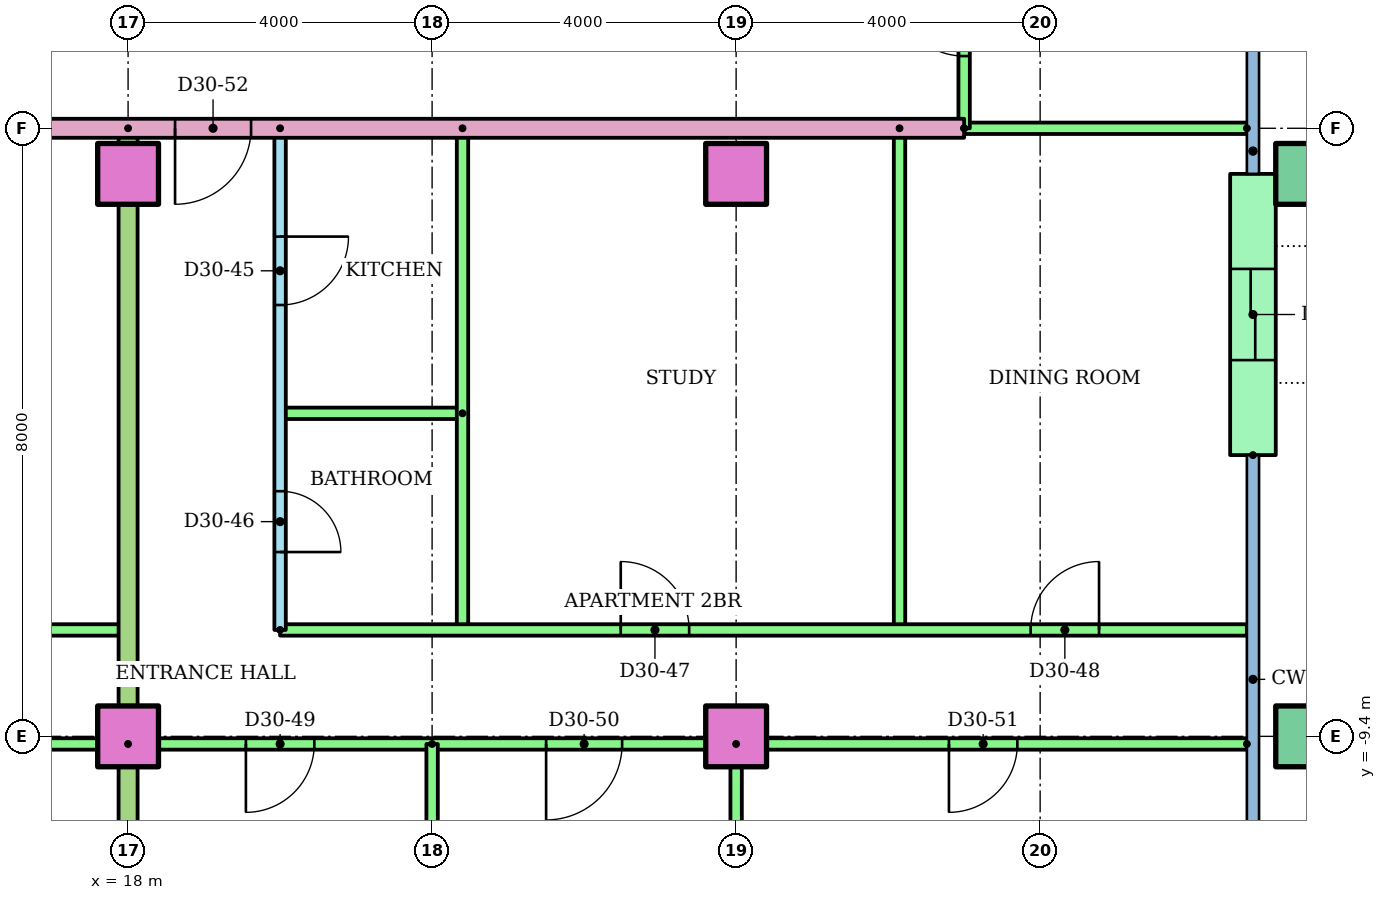
"""IFC4 building model, lengths in metres.
Left out: names, types, materials, properties, quantities, classifications, styles, units other than length and angle.
Written with IfcOpenShell. Run it as: python <this file> out.ifc"""

import sys

from ifc_helpers import new_model, si_unit, direction, frame, frame_2d, origin, origin_2d, place, context, subcontext, project, spatial, rectangle, hollow_rectangle, extrude, element, fill, save


model = new_model("IFC4")
c1 = context("Model", 3, precision=1e-05, world=origin(), true_north=direction((0.0, 1.0)))
c2 = subcontext(c1, "Body", "Model", "MODEL_VIEW")
j1 = project(units=[si_unit("LENGTHUNIT", "METRE"), si_unit("PLANEANGLEUNIT", "RADIAN")], contexts=[c1])
p1 = place(None, origin())
s1 = spatial("IfcSite", under=j1, at=p1, CompositionType="ELEMENT")
p2 = place(p1, origin())
s2 = spatial("IfcBuilding", under=s1, at=p2, CompositionType="ELEMENT")
p3 = place(p2, frame((0.0, 0.0, 119.8)))
s3 = spatial("IfcBuildingStorey", under=s2, at=p3, CompositionType="ELEMENT", Elevation=119.8)
for number, where in (
    (1, (18.0, -9.4, 0.0)),
    (2, (26.0, -9.4, 0.0)),
):
    element("IfcColumn", number, at=place(p3, frame(where)), inside=s3, PredefinedType="COLUMN", context=c2, shape_type="SweptSolid", body=[
        extrude(rectangle(XDim=0.8, YDim=0.8, at=origin_2d()), origin(), (0.0, 0.0, 1.0), 3.2),
    ])
p4 = place(p3, frame((33.5, -9.4, 0.0)))
e3 = element("IfcColumn", 3, at=p4, inside=s3, PredefinedType="COLUMN", context=c2, shape_type="SweptSolid", body=[
    extrude(hollow_rectangle(XDim=0.8, YDim=0.8, WallThickness=0.04, at=origin_2d()), origin(), (0.0, 0.0, 1.0), 3.2),
])
for number, where in (
    (4, (18.0, -2.0, 0.0)),
    (5, (26.0, -2.0, 0.0)),
):
    element("IfcColumn", number, at=place(p3, frame(where)), inside=s3, PredefinedType="COLUMN", context=c2, shape_type="SweptSolid", body=[
        extrude(rectangle(XDim=0.8, YDim=0.8, at=origin_2d()), origin(), (0.0, 0.0, 1.0), 3.2),
    ])
p5 = place(p3, frame((33.5, -2.0, 0.0)))
e6 = element("IfcColumn", 6, at=p5, inside=s3, PredefinedType="COLUMN", context=c2, shape_type="SweptSolid", body=[
    extrude(hollow_rectangle(XDim=0.8, YDim=0.8, WallThickness=0.04, at=origin_2d()), origin(), (0.0, 0.0, 1.0), 3.2),
])
p6 = place(p3, frame((32.8, -5.7, 0.0), z_axis=(0.0, 0.0, 1.0), x_axis=(0.0, 1.0, 0.0)))
e7 = element("IfcWall", 7, at=p6, inside=s3, PredefinedType="STANDARD", context=c2, shape_type="SweptSolid", body=[
    extrude(rectangle(XDim=3.7, YDim=0.6, at=frame_2d((1.85, 0.0))), origin(), (0.0, 0.0, 1.0), 2.92),
])
p7 = place(p6, frame((1.25, 0.0, 0.0)))
e8 = element("IfcOpeningElement", 8, at=p7, cuts=e7, PredefinedType="OPENING", context=c2, shape_type="SweptSolid", body=[
    extrude(rectangle(XDim=1.2, YDim=2.1, at=frame_2d((0.6, 1.05))), frame((0.0, 0.31, 0.0), z_axis=(0.0, -1.0, 0.0), x_axis=(1.0, 0.0, 0.0)), (0.0, 0.0, 1.0), 0.62),
])
p8 = place(p3, frame((4.0, -8.0, 0.0)))
e9 = element("IfcWall", 9, at=p8, inside=s3, PredefinedType="PARTITIONING", context=c2, shape_type="SweptSolid", body=[
    extrude(rectangle(XDim=14.0, YDim=0.15, at=frame_2d((7.0, 0.0))), origin(), (0.0, 0.0, 1.0), 2.4),
])
p9 = place(p8, frame((4.325, 0.0, 0.0)))
e10 = element("IfcOpeningElement", 10, at=p9, cuts=e9, PredefinedType="OPENING", context=c2, shape_type="SweptSolid", body=[
    extrude(rectangle(XDim=0.9, YDim=2.1, at=frame_2d((0.45, 1.05))), frame((0.0, 0.085, 0.0), z_axis=(0.0, -1.0, 0.0), x_axis=(1.0, 0.0, 0.0)), (0.0, 0.0, 1.0), 0.17),
])
p10 = place(p8, frame((8.575, 0.0, 0.0)))
e11 = element("IfcOpeningElement", 11, at=p10, cuts=e9, PredefinedType="OPENING", context=c2, shape_type="SweptSolid", body=[
    extrude(rectangle(XDim=0.9, YDim=2.1, at=frame_2d((0.45, 1.05))), frame((0.0, 0.085, 0.0), z_axis=(0.0, -1.0, 0.0), x_axis=(1.0, 0.0, 0.0)), (0.0, 0.0, 1.0), 0.17),
])
p11 = place(p8, frame((12.0, 0.0, 0.0)))
e12 = element("IfcOpeningElement", 12, at=p11, cuts=e9, PredefinedType="OPENING", context=c2, shape_type="SweptSolid", body=[
    extrude(rectangle(XDim=0.9, YDim=2.1, at=frame_2d((0.45, 1.05))), frame((0.0, 0.085, 0.0), z_axis=(0.0, -1.0, 0.0), x_axis=(1.0, 0.0, 0.0)), (0.0, 0.0, 1.0), 0.17),
])
p12 = place(p3, frame((18.0, -9.5, 0.0), z_axis=(0.0, 0.0, 1.0), x_axis=(-1.0, 0.0, 0.0)))
e13 = element("IfcWall", 13, at=p12, inside=s3, PredefinedType="PARTITIONING", context=c2, shape_type="SweptSolid", body=[
    extrude(rectangle(XDim=16.0, YDim=0.15, at=frame_2d((8.0, 0.0))), origin(), (0.0, 0.0, 1.0), 2.4),
])
p13 = place(p12, frame((13.55, 0.0, 0.0)))
e14 = element("IfcOpeningElement", 14, at=p13, cuts=e13, PredefinedType="OPENING", context=c2, shape_type="SweptSolid", body=[
    extrude(rectangle(XDim=0.9, YDim=2.1, at=frame_2d((0.45, 1.05))), frame((0.0, 0.085, 0.0), z_axis=(0.0, -1.0, 0.0), x_axis=(1.0, 0.0, 0.0)), (0.0, 0.0, 1.0), 0.17),
])
p14 = place(p12, frame((9.55, 0.0, 0.0)))
e15 = element("IfcOpeningElement", 15, at=p14, cuts=e13, PredefinedType="OPENING", context=c2, shape_type="SweptSolid", body=[
    extrude(rectangle(XDim=0.9, YDim=2.1, at=frame_2d((0.45, 1.05))), frame((0.0, 0.085, 0.0), z_axis=(0.0, -1.0, 0.0), x_axis=(1.0, 0.0, 0.0)), (0.0, 0.0, 1.0), 0.17),
])
p15 = place(p12, frame((5.55, 0.0, 0.0)))
e16 = element("IfcOpeningElement", 16, at=p15, cuts=e13, PredefinedType="OPENING", context=c2, shape_type="SweptSolid", body=[
    extrude(rectangle(XDim=0.9, YDim=2.1, at=frame_2d((0.45, 1.05))), frame((0.0, 0.085, 0.0), z_axis=(0.0, -1.0, 0.0), x_axis=(1.0, 0.0, 0.0)), (0.0, 0.0, 1.0), 0.17),
])
p16 = place(p12, frame((1.5, 0.0, 0.0)))
e17 = element("IfcOpeningElement", 17, at=p16, cuts=e13, PredefinedType="OPENING", context=c2, shape_type="SweptSolid", body=[
    extrude(rectangle(XDim=1.0, YDim=2.1, at=frame_2d((0.5, 1.05))), frame((0.0, 0.085, 0.0), z_axis=(0.0, -1.0, 0.0), x_axis=(1.0, 0.0, 0.0)), (0.0, 0.0, 1.0), 0.17),
])
p17 = place(p3, frame((20.0, -1.4, 0.0), z_axis=(0.0, 0.0, 1.0), x_axis=(0.0, -1.0, 0.0)))
e18 = element("IfcWall", 18, at=p17, inside=s3, PredefinedType="PARTITIONING", context=c2, shape_type="SweptSolid", body=[
    extrude(rectangle(XDim=6.6, YDim=0.15, at=frame_2d((3.3, 0.0))), origin(), (0.0, 0.0, 1.0), 2.4),
])
p18 = place(p17, frame((1.425, 0.0, 0.0)))
e19 = element("IfcOpeningElement", 19, at=p18, cuts=e18, PredefinedType="OPENING", context=c2, shape_type="SweptSolid", body=[
    extrude(rectangle(XDim=0.9, YDim=2.1, at=frame_2d((0.45, 1.05))), frame((0.0, 0.085, 0.0), z_axis=(0.0, -1.0, 0.0), x_axis=(1.0, 0.0, 0.0)), (0.0, 0.0, 1.0), 0.17),
])
p19 = place(p17, frame((4.775, 0.0, 0.0)))
e20 = element("IfcOpeningElement", 20, at=p19, cuts=e18, PredefinedType="OPENING", context=c2, shape_type="SweptSolid", body=[
    extrude(rectangle(XDim=0.8, YDim=2.1, at=frame_2d((0.4, 1.05))), frame((0.0, 0.085, 0.0), z_axis=(0.0, -1.0, 0.0), x_axis=(1.0, 0.0, 0.0)), (0.0, 0.0, 1.0), 0.17),
])
p20 = place(p3, frame((22.4, -5.15, 0.0), z_axis=(0.0, 0.0, 1.0), x_axis=(-1.0, 0.0, 0.0)))
e21 = element("IfcWall", 21, at=p20, inside=s3, PredefinedType="PARTITIONING", context=c2, shape_type="SweptSolid", body=[
    extrude(rectangle(XDim=2.4, YDim=0.15, at=frame_2d((1.2, 0.0))), origin(), (0.0, 0.0, 1.0), 2.4),
])
for number, where, z_axis, x_axis in (
    (22, (22.4, -1.4, 0.0), (0.0, 0.0, 1.0), (0.0, -1.0, 0.0)),
    (23, (28.15, -1.4, 0.0), (0.0, 0.0, 1.0), (0.0, -1.0, 0.0)),
):
    element("IfcWall", number, at=place(p3, frame(where, z_axis=z_axis, x_axis=x_axis)), inside=s3, PredefinedType="PARTITIONING", context=c2, shape_type="SweptSolid", body=[
        extrude(rectangle(XDim=6.6, YDim=0.15, at=frame_2d((3.3, 0.0))), origin(), (0.0, 0.0, 1.0), 2.4),
    ])
p21 = place(p3, frame((20.0, -8.0, 0.0)))
e24 = element("IfcWall", 24, at=p21, inside=s3, PredefinedType="PARTITIONING", context=c2, shape_type="SweptSolid", body=[
    extrude(rectangle(XDim=12.72, YDim=0.15, at=frame_2d((6.36, 0.0))), origin(), (0.0, 0.0, 1.0), 2.4),
])
p22 = place(p21, frame((4.482, 0.0, 0.0)))
e25 = element("IfcOpeningElement", 25, at=p22, cuts=e24, PredefinedType="OPENING", context=c2, shape_type="SweptSolid", body=[
    extrude(rectangle(XDim=0.9, YDim=2.1, at=frame_2d((0.45, 1.05))), frame((0.0, 0.085, 0.0), z_axis=(0.0, -1.0, 0.0), x_axis=(1.0, 0.0, 0.0)), (0.0, 0.0, 1.0), 0.17),
])
p23 = place(p21, frame((9.875, 0.0, 0.0)))
e26 = element("IfcOpeningElement", 26, at=p23, cuts=e24, PredefinedType="OPENING", context=c2, shape_type="SweptSolid", body=[
    extrude(rectangle(XDim=0.9, YDim=2.1, at=frame_2d((0.45, 1.05))), frame((0.0, 0.085, 0.0), z_axis=(0.0, -1.0, 0.0), x_axis=(1.0, 0.0, 0.0)), (0.0, 0.0, 1.0), 0.17),
])
p24 = place(p3, frame((32.72, -9.5, 0.0), z_axis=(0.0, 0.0, 1.0), x_axis=(-1.0, 0.0, 0.0)))
e27 = element("IfcWall", 27, at=p24, inside=s3, PredefinedType="PARTITIONING", context=c2, shape_type="SweptSolid", body=[
    extrude(rectangle(XDim=14.72, YDim=0.15, at=frame_2d((7.36, 0.0))), origin(), (0.0, 0.0, 1.0), 2.4),
])
p25 = place(p24, frame((12.27, 0.0, 0.0)))
e28 = element("IfcOpeningElement", 28, at=p25, cuts=e27, PredefinedType="OPENING", context=c2, shape_type="SweptSolid", body=[
    extrude(rectangle(XDim=0.9, YDim=2.1, at=frame_2d((0.45, 1.05))), frame((0.0, 0.085, 0.0), z_axis=(0.0, -1.0, 0.0), x_axis=(1.0, 0.0, 0.0)), (0.0, 0.0, 1.0), 0.17),
])
p26 = place(p24, frame((8.22, 0.0, 0.0)))
e29 = element("IfcOpeningElement", 29, at=p26, cuts=e27, PredefinedType="OPENING", context=c2, shape_type="SweptSolid", body=[
    extrude(rectangle(XDim=1.0, YDim=2.1, at=frame_2d((0.5, 1.05))), frame((0.0, 0.085, 0.0), z_axis=(0.0, -1.0, 0.0), x_axis=(1.0, 0.0, 0.0)), (0.0, 0.0, 1.0), 0.17),
])
p27 = place(p24, frame((3.02, 0.0, 0.0)))
e30 = element("IfcOpeningElement", 30, at=p27, cuts=e27, PredefinedType="OPENING", context=c2, shape_type="SweptSolid", body=[
    extrude(rectangle(XDim=0.9, YDim=2.1, at=frame_2d((0.45, 1.05))), frame((0.0, 0.085, 0.0), z_axis=(0.0, -1.0, 0.0), x_axis=(1.0, 0.0, 0.0)), (0.0, 0.0, 1.0), 0.17),
])
p28 = place(p3, frame((22.0, -9.5, 0.0), z_axis=(0.0, 0.0, 1.0), x_axis=(0.0, -1.0, 0.0)))
e31 = element("IfcWall", 31, at=p28, inside=s3, PredefinedType="PARTITIONING", context=c2, shape_type="SweptSolid", body=[
    extrude(rectangle(XDim=6.821, YDim=0.15, at=frame_2d((3.411, 0.0))), origin(), (0.0, 0.0, 1.0), 2.4),
])
p29 = place(p3, frame((26.0, -9.5, 0.0), z_axis=(0.0, 0.0, 1.0), x_axis=(0.0, -1.0, 0.0)))
e32 = element("IfcWall", 32, at=p29, inside=s3, PredefinedType="PARTITIONING", context=c2, shape_type="SweptSolid", body=[
    extrude(rectangle(XDim=6.81, YDim=0.15, at=frame_2d((3.405, 0.0))), origin(), (0.0, 0.0, 1.0), 2.4),
])
p30 = place(p3, frame((18.0, -1.4, 0.0), z_axis=(0.0, 0.0, 1.0), x_axis=(0.0, -1.0, 0.0)))
e33 = element("IfcWall", 33, at=p30, inside=s3, PredefinedType="PARTITIONING", context=c2, shape_type="SweptSolid", body=[
    extrude(rectangle(XDim=14.91, YDim=0.25, at=frame_2d((7.455, 0.0))), origin(), (0.0, 0.0, 1.0), 2.4),
])
p31 = place(p3, frame((29.0, -1.4, 0.0), z_axis=(0.0, 0.0, 1.0), x_axis=(-1.0, 0.0, 0.0)))
e34 = element("IfcWall", 34, at=p31, inside=s3, PredefinedType="PARTITIONING", context=c2, shape_type="SweptSolid", body=[
    extrude(rectangle(XDim=15.0, YDim=0.25, at=frame_2d((7.5, 0.0))), origin(), (0.0, 0.0, 1.0), 2.4),
])
p32 = place(p31, frame((9.382, 0.0, 0.0)))
e35 = element("IfcOpeningElement", 35, at=p32, cuts=e34, PredefinedType="OPENING", context=c2, shape_type="SweptSolid", body=[
    extrude(rectangle(XDim=1.0, YDim=2.1, at=frame_2d((0.5, 1.05))), frame((0.0, 0.135, 0.0), z_axis=(0.0, -1.0, 0.0), x_axis=(1.0, 0.0, 0.0)), (0.0, 0.0, 1.0), 0.27),
])
p33 = place(p3, frame((32.72, -1.4, 0.0), z_axis=(0.0, 0.0, 1.0), x_axis=(-1.0, 0.0, 0.0)))
e36 = element("IfcWall", 36, at=p33, inside=s3, PredefinedType="PARTITIONING", context=c2, shape_type="SweptSolid", body=[
    extrude(rectangle(XDim=3.72, YDim=0.15, at=frame_2d((1.86, 0.0))), origin(), (0.0, 0.0, 1.0), 2.4),
])
p34 = place(p3, frame((29.0, -1.4, 0.0), z_axis=(0.0, 0.0, 1.0), x_axis=(0.0, 1.0, 0.0)))
e37 = element("IfcWall", 37, at=p34, inside=s3, PredefinedType="PARTITIONING", context=c2, shape_type="SweptSolid", body=[
    extrude(rectangle(XDim=2.8, YDim=0.15, at=frame_2d((1.4, 0.0))), origin(), (0.0, 0.0, 1.0), 2.4),
])
p35 = place(p34, frame((0.95, 0.0, 0.0)))
e38 = element("IfcOpeningElement", 38, at=p35, cuts=e37, PredefinedType="OPENING", context=c2, shape_type="SweptSolid", body=[
    extrude(rectangle(XDim=0.9, YDim=2.1, at=frame_2d((0.45, 1.05))), frame((0.0, 0.085, 0.0), z_axis=(0.0, -1.0, 0.0), x_axis=(1.0, 0.0, 0.0)), (0.0, 0.0, 1.0), 0.17),
])
p36 = place(p18, origin())
e39 = element("IfcDoor", 39, at=p36, inside=s3, OperationType="SINGLE_SWING_LEFT", PredefinedType="DOOR", context=c2, shape_type="SweptSolid", body=[
    extrude(rectangle(XDim=0.9, YDim=2.1, at=frame_2d((0.45, 1.05))), frame((0.0, 0.025, 0.0), z_axis=(0.0, -1.0, 0.0), x_axis=(1.0, 0.0, 0.0)), (0.0, 0.0, 1.0), 0.05),
])
fill(e19, e39)
p37 = place(p19, origin())
e40 = element("IfcDoor", 40, at=p37, inside=s3, OperationType="SINGLE_SWING_RIGHT", PredefinedType="DOOR", context=c2, shape_type="SweptSolid", body=[
    extrude(rectangle(XDim=0.8, YDim=2.1, at=frame_2d((0.4, 1.05))), frame((0.0, 0.025, 0.0), z_axis=(0.0, -1.0, 0.0), x_axis=(1.0, 0.0, 0.0)), (0.0, 0.0, 1.0), 0.05),
])
fill(e20, e40)
p38 = place(p22, origin())
e41 = element("IfcDoor", 41, at=p38, inside=s3, OperationType="SINGLE_SWING_LEFT", PredefinedType="DOOR", context=c2, shape_type="SweptSolid", body=[
    extrude(rectangle(XDim=0.9, YDim=2.1, at=frame_2d((0.45, 1.05))), frame((0.0, 0.025, 0.0), z_axis=(0.0, -1.0, 0.0), x_axis=(1.0, 0.0, 0.0)), (0.0, 0.0, 1.0), 0.05),
])
fill(e25, e41)
p39 = place(p23, origin())
e42 = element("IfcDoor", 42, at=p39, inside=s3, OperationType="SINGLE_SWING_RIGHT", PredefinedType="DOOR", context=c2, shape_type="SweptSolid", body=[
    extrude(rectangle(XDim=0.9, YDim=2.1, at=frame_2d((0.45, 1.05))), frame((0.0, 0.025, 0.0), z_axis=(0.0, -1.0, 0.0), x_axis=(1.0, 0.0, 0.0)), (0.0, 0.0, 1.0), 0.05),
])
fill(e26, e42)
p40 = place(p25, origin())
e43 = element("IfcDoor", 43, at=p40, inside=s3, OperationType="SINGLE_SWING_RIGHT", PredefinedType="DOOR", context=c2, shape_type="SweptSolid", body=[
    extrude(rectangle(XDim=0.9, YDim=2.1, at=frame_2d((0.45, 1.05))), frame((0.0, 0.025, 0.0), z_axis=(0.0, -1.0, 0.0), x_axis=(1.0, 0.0, 0.0)), (0.0, 0.0, 1.0), 0.05),
])
fill(e28, e43)
p41 = place(p26, origin())
e44 = element("IfcDoor", 44, at=p41, inside=s3, OperationType="SINGLE_SWING_RIGHT", PredefinedType="DOOR", context=c2, shape_type="SweptSolid", body=[
    extrude(rectangle(XDim=1.0, YDim=2.1, at=frame_2d((0.5, 1.05))), frame((0.0, 0.025, 0.0), z_axis=(0.0, -1.0, 0.0), x_axis=(1.0, 0.0, 0.0)), (0.0, 0.0, 1.0), 0.05),
])
fill(e29, e44)
p42 = place(p27, origin())
e45 = element("IfcDoor", 45, at=p42, inside=s3, OperationType="SINGLE_SWING_RIGHT", PredefinedType="DOOR", context=c2, shape_type="SweptSolid", body=[
    extrude(rectangle(XDim=0.9, YDim=2.1, at=frame_2d((0.45, 1.05))), frame((0.0, 0.025, 0.0), z_axis=(0.0, -1.0, 0.0), x_axis=(1.0, 0.0, 0.0)), (0.0, 0.0, 1.0), 0.05),
])
fill(e30, e45)
p43 = place(p32, origin())
e46 = element("IfcDoor", 46, at=p43, inside=s3, OperationType="SINGLE_SWING_RIGHT", PredefinedType="DOOR", context=c2, shape_type="SweptSolid", body=[
    extrude(rectangle(XDim=1.0, YDim=2.1, at=frame_2d((0.5, 1.05))), frame((0.0, 0.025, 0.0), z_axis=(0.0, -1.0, 0.0), x_axis=(1.0, 0.0, 0.0)), (0.0, 0.0, 1.0), 0.05),
])
fill(e35, e46)
p44 = place(p35, origin())
e47 = element("IfcDoor", 47, at=p44, inside=s3, OperationType="SINGLE_SWING_RIGHT", PredefinedType="DOOR", context=c2, shape_type="SweptSolid", body=[
    extrude(rectangle(XDim=0.9, YDim=2.1, at=frame_2d((0.45, 1.05))), frame((0.0, 0.025, 0.0), z_axis=(0.0, -1.0, 0.0), x_axis=(1.0, 0.0, 0.0)), (0.0, 0.0, 1.0), 0.05),
])
fill(e38, e47)
p45 = place(p7, origin())
e48 = element("IfcDoor", 48, at=p45, inside=s3, OperationType="SLIDING_TO_LEFT", PredefinedType="DOOR", context=c2, shape_type="SweptSolid", body=[
    extrude(rectangle(XDim=1.2, YDim=2.1, at=frame_2d((0.6, 1.05))), frame((0.0, 0.025, 0.0), z_axis=(0.0, -1.0, 0.0), x_axis=(1.0, 0.0, 0.0)), (0.0, 0.0, 1.0), 0.05),
])
fill(e8, e48)
save(model, sys.argv[1])
